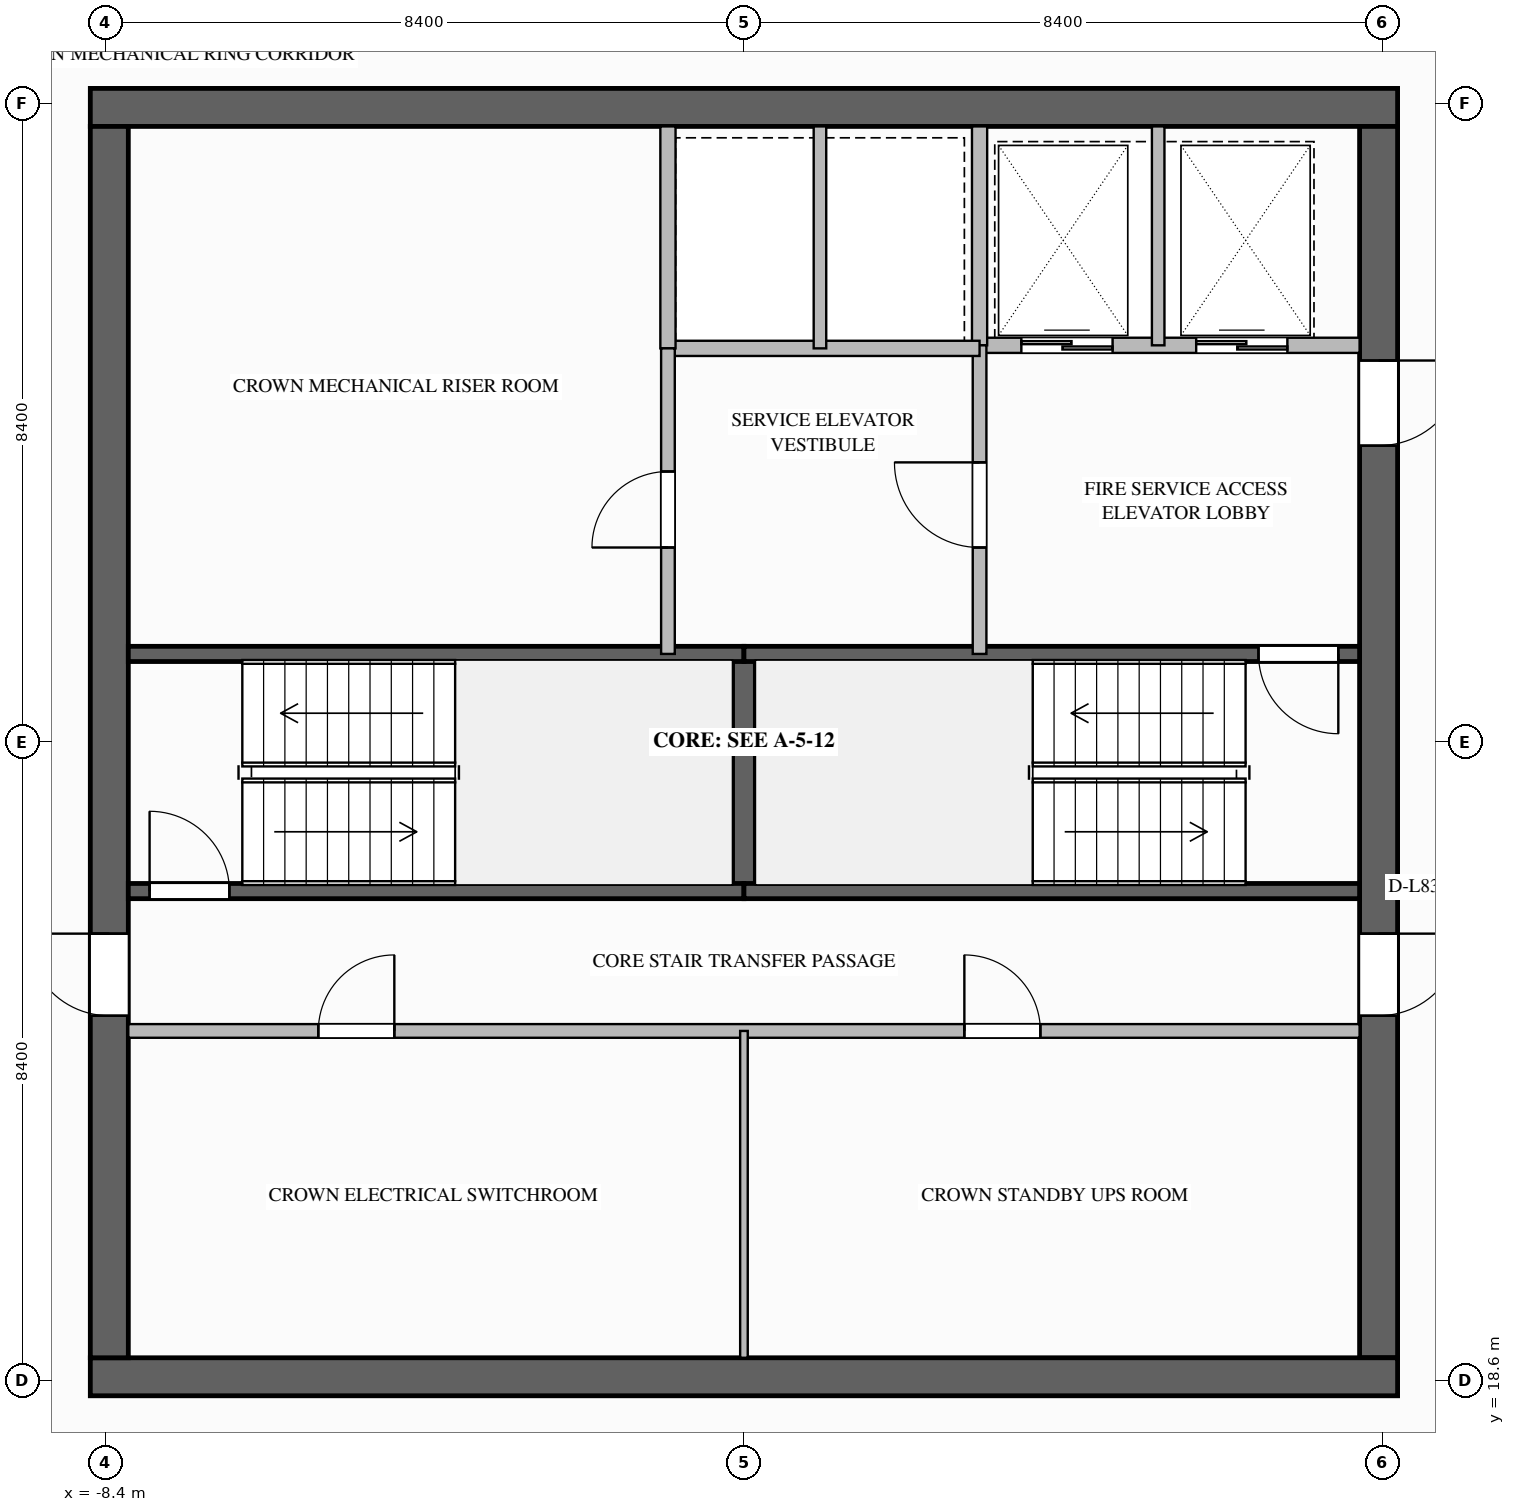
"""IFC4 building model, lengths in metres.
Left out: names, types, materials, properties, quantities, classifications, styles, units other than length and angle.
Written with IfcOpenShell. Run it as: python <this file> out.ifc"""

import sys

from ifc_helpers import new_model, si_unit, direction, frame, frame_2d, origin, place, context, subcontext, project, spatial, rectangle, extrude, element, fill, save


model = new_model("IFC4")
c1 = context("Model", 3, precision=1e-05, world=origin(), true_north=direction((0.0, 1.0)))
c2 = subcontext(c1, "Body", "Model", "MODEL_VIEW")
j1 = project(units=[si_unit("LENGTHUNIT", "METRE"), si_unit("PLANEANGLEUNIT", "RADIAN")], contexts=[c1])
p1 = place(None, origin())
s1 = spatial("IfcSite", under=j1, at=p1, CompositionType="ELEMENT")
p2 = place(p1, origin())
s2 = spatial("IfcBuilding", under=s1, at=p2, CompositionType="ELEMENT")
p3 = place(p2, frame((0.0, 0.0, 319.4)))
s3 = spatial("IfcBuildingStorey", under=s2, at=p3, CompositionType="ELEMENT", Elevation=319.4)
p4 = place(p3, frame((-8.6, 35.35, 0.0), z_axis=(0.0, 0.0, 1.0), x_axis=(1.0, 0.0, 0.0)))
e1 = element("IfcWall", 1, at=p4, inside=s3, PredefinedType="SHEAR", context=c2, shape_type="SweptSolid", body=[
    extrude(rectangle(XDim=17.2, YDim=0.5, at=frame_2d((8.6, 0.0))), origin(), (0.0, 0.0, 1.0), 3.8),
])
p5 = place(p3, frame((8.35, 35.1, 0.0), z_axis=(0.0, 0.0, 1.0), x_axis=(0.0, -1.0, 0.0)))
e2 = element("IfcWall", 2, at=p5, inside=s3, PredefinedType="SHEAR", context=c2, shape_type="SweptSolid", body=[
    extrude(rectangle(XDim=16.2, YDim=0.5, at=frame_2d((8.1, 0.0))), origin(), (0.0, 0.0, 1.0), 3.8),
])
p6 = place(p5, frame((3.08, 0.0, 0.0)))
e3 = element("IfcOpeningElement", 3, at=p6, cuts=e2, PredefinedType="OPENING", context=c2, shape_type="SweptSolid", body=[
    extrude(rectangle(XDim=1.12, YDim=2.1, at=frame_2d((0.56, 1.05))), frame((0.0, 0.26, 0.0), z_axis=(0.0, -1.0, 0.0), x_axis=(1.0, 0.0, 0.0)), (0.0, 0.0, 1.0), 0.52),
])
p7 = place(p5, frame((10.62, 0.0, 0.0)))
e4 = element("IfcOpeningElement", 4, at=p7, cuts=e2, PredefinedType="OPENING", context=c2, shape_type="SweptSolid", body=[
    extrude(rectangle(XDim=1.08, YDim=2.04, at=frame_2d((0.54, 1.02))), frame((0.0, 0.26, 0.0), z_axis=(0.0, -1.0, 0.0), x_axis=(1.0, 0.0, 0.0)), (0.0, 0.0, 1.0), 0.52),
])
p8 = place(p3, frame((8.6, 18.65, 0.0), z_axis=(0.0, 0.0, 1.0), x_axis=(-1.0, 0.0, 0.0)))
e5 = element("IfcWall", 5, at=p8, inside=s3, PredefinedType="SHEAR", context=c2, shape_type="SweptSolid", body=[
    extrude(rectangle(XDim=17.2, YDim=0.5, at=frame_2d((8.6, 0.0))), origin(), (0.0, 0.0, 1.0), 3.8),
])
p9 = place(p3, frame((-8.35, 18.9, 0.0), z_axis=(0.0, 0.0, 1.0), x_axis=(0.0, 1.0, 0.0)))
e6 = element("IfcWall", 6, at=p9, inside=s3, PredefinedType="SHEAR", context=c2, shape_type="SweptSolid", body=[
    extrude(rectangle(XDim=16.2, YDim=0.5, at=frame_2d((8.1, 0.0))), origin(), (0.0, 0.0, 1.0), 3.8),
])
p10 = place(p9, frame((4.5, 0.0, 0.0)))
e7 = element("IfcOpeningElement", 7, at=p10, cuts=e6, PredefinedType="OPENING", context=c2, shape_type="SweptSolid", body=[
    extrude(rectangle(XDim=1.08, YDim=2.04, at=frame_2d((0.54, 1.02))), frame((0.0, 0.26, 0.0), z_axis=(0.0, -1.0, 0.0), x_axis=(1.0, 0.0, 0.0)), (0.0, 0.0, 1.0), 0.52),
])
p11 = place(p3, frame((0.0, 25.04, 0.0), z_axis=(0.0, 0.0, 1.0), x_axis=(0.0, 1.0, 0.0)))
e8 = element("IfcWall", 8, at=p11, inside=s3, PredefinedType="SOLIDWALL", context=c2, shape_type="SweptSolid", body=[
    extrude(rectangle(XDim=3.12, YDim=0.3, at=frame_2d((1.56, 0.0))), origin(), (0.0, 0.0, 1.0), 3.48),
])
p12 = place(p3, frame((-8.1, 25.04, 0.0), z_axis=(0.0, 0.0, 1.0), x_axis=(1.0, 0.0, 0.0)))
e9 = element("IfcWall", 9, at=p12, inside=s3, PredefinedType="SOLIDWALL", context=c2, shape_type="SweptSolid", body=[
    extrude(rectangle(XDim=8.1, YDim=0.2, at=frame_2d((4.05, 0.0))), origin(), (0.0, 0.0, 1.0), 3.48),
])
p13 = place(p12, frame((0.28, 0.0, 0.0)))
e10 = element("IfcOpeningElement", 10, at=p13, cuts=e9, PredefinedType="OPENING", context=c2, shape_type="SweptSolid", body=[
    extrude(rectangle(XDim=1.05, YDim=2.1, at=frame_2d((0.525, 1.05))), frame((0.0, 0.11, 0.0), z_axis=(0.0, -1.0, 0.0), x_axis=(1.0, 0.0, 0.0)), (0.0, 0.0, 1.0), 0.22),
])
for number, where, z_axis, x_axis in (
    (11, (-8.1, 28.16, 0.0), (0.0, 0.0, 1.0), (1.0, 0.0, 0.0)),
    (12, (0.0, 25.04, 0.0), (0.0, 0.0, 1.0), (1.0, 0.0, 0.0)),
):
    element("IfcWall", number, at=place(p3, frame(where, z_axis=z_axis, x_axis=x_axis)), inside=s3, PredefinedType="SOLIDWALL", context=c2, shape_type="SweptSolid", body=[
        extrude(rectangle(XDim=8.1, YDim=0.2, at=frame_2d((4.05, 0.0))), origin(), (0.0, 0.0, 1.0), 3.48),
    ])
p14 = place(p3, frame((8.1, 28.16, 0.0), z_axis=(0.0, 0.0, 1.0), x_axis=(-1.0, 0.0, 0.0)))
e13 = element("IfcWall", 13, at=p14, inside=s3, PredefinedType="SOLIDWALL", context=c2, shape_type="SweptSolid", body=[
    extrude(rectangle(XDim=8.1, YDim=0.2, at=frame_2d((4.05, 0.0))), origin(), (0.0, 0.0, 1.0), 3.48),
])
p15 = place(p14, frame((0.28, 0.0, 0.0)))
e14 = element("IfcOpeningElement", 14, at=p15, cuts=e13, PredefinedType="OPENING", context=c2, shape_type="SweptSolid", body=[
    extrude(rectangle(XDim=1.05, YDim=2.1, at=frame_2d((0.525, 1.05))), frame((0.0, 0.11, 0.0), z_axis=(0.0, -1.0, 0.0), x_axis=(1.0, 0.0, 0.0)), (0.0, 0.0, 1.0), 0.22),
])
p16 = place(p3, frame((3.1, 32.22, 0.0), z_axis=(0.0, 0.0, 1.0), x_axis=(1.0, 0.0, 0.0)))
e15 = element("IfcWall", 15, at=p16, inside=s3, PredefinedType="SOLIDWALL", context=c2, shape_type="SweptSolid", body=[
    extrude(rectangle(XDim=5.0, YDim=0.2, at=frame_2d((2.5, 0.0))), origin(), (0.0, 0.0, 1.0), 3.48),
])
p17 = place(p16, frame((0.55, 0.0, 0.0)))
e16 = element("IfcOpeningElement", 16, at=p17, cuts=e15, PredefinedType="OPENING", context=c2, shape_type="SweptSolid", body=[
    extrude(rectangle(XDim=1.2, YDim=2.2, at=frame_2d((0.6, 1.1))), frame((0.0, 0.11, 0.0), z_axis=(0.0, -1.0, 0.0), x_axis=(1.0, 0.0, 0.0)), (0.0, 0.0, 1.0), 0.22),
])
p18 = place(p16, frame((2.85, 0.0, 0.0)))
e17 = element("IfcOpeningElement", 17, at=p18, cuts=e15, PredefinedType="OPENING", context=c2, shape_type="SweptSolid", body=[
    extrude(rectangle(XDim=1.2, YDim=2.2, at=frame_2d((0.6, 1.1))), frame((0.0, 0.11, 0.0), z_axis=(0.0, -1.0, 0.0), x_axis=(1.0, 0.0, 0.0)), (0.0, 0.0, 1.0), 0.22),
])
p19 = place(p3, frame((3.1, 32.22, 0.0), z_axis=(0.0, 0.0, 1.0), x_axis=(0.0, 1.0, 0.0)))
e18 = element("IfcWall", 18, at=p19, inside=s3, PredefinedType="SOLIDWALL", context=c2, shape_type="SweptSolid", body=[
    extrude(rectangle(XDim=2.88, YDim=0.2, at=frame_2d((1.44, 0.0))), origin(), (0.0, 0.0, 1.0), 3.48),
])
p20 = place(p3, frame((5.45, 32.22, 0.0), z_axis=(0.0, 0.0, 1.0), x_axis=(0.0, 1.0, 0.0)))
e19 = element("IfcWall", 19, at=p20, inside=s3, PredefinedType="PARTITIONING", context=c2, shape_type="SweptSolid", body=[
    extrude(rectangle(XDim=2.88, YDim=0.165, at=frame_2d((1.44, 0.0))), origin(), (0.0, 0.0, 1.0), 3.48),
])
p21 = place(p3, frame((3.1, 28.16, 0.0), z_axis=(0.0, 0.0, 1.0), x_axis=(0.0, 1.0, 0.0)))
e20 = element("IfcWall", 20, at=p21, inside=s3, PredefinedType="SOLIDWALL", context=c2, shape_type="SweptSolid", body=[
    extrude(rectangle(XDim=4.06, YDim=0.18, at=frame_2d((2.03, 0.0))), origin(), (0.0, 0.0, 1.0), 3.48),
])
p22 = place(p21, frame((1.4, 0.0, 0.0)))
e21 = element("IfcOpeningElement", 21, at=p22, cuts=e20, PredefinedType="OPENING", context=c2, shape_type="SweptSolid", body=[
    extrude(rectangle(XDim=1.12, YDim=2.1, at=frame_2d((0.56, 1.05))), frame((0.0, 0.1, 0.0), z_axis=(0.0, -1.0, 0.0), x_axis=(1.0, 0.0, 0.0)), (0.0, 0.0, 1.0), 0.2),
])
p23 = place(p3, frame((-1.0, 32.18, 0.0), z_axis=(0.0, 0.0, 1.0), x_axis=(1.0, 0.0, 0.0)))
e22 = element("IfcWall", 22, at=p23, inside=s3, PredefinedType="SOLIDWALL", context=c2, shape_type="SweptSolid", body=[
    extrude(rectangle(XDim=4.1, YDim=0.2, at=frame_2d((2.05, 0.0))), origin(), (0.0, 0.0, 1.0), 3.48),
])
p24 = place(p3, frame((-1.0, 32.18, 0.0), z_axis=(0.0, 0.0, 1.0), x_axis=(0.0, 1.0, 0.0)))
e23 = element("IfcWall", 23, at=p24, inside=s3, PredefinedType="SOLIDWALL", context=c2, shape_type="SweptSolid", body=[
    extrude(rectangle(XDim=2.92, YDim=0.2, at=frame_2d((1.46, 0.0))), origin(), (0.0, 0.0, 1.0), 3.48),
])
p25 = place(p3, frame((1.0, 32.18, 0.0), z_axis=(0.0, 0.0, 1.0), x_axis=(0.0, 1.0, 0.0)))
e24 = element("IfcWall", 24, at=p25, inside=s3, PredefinedType="PARTITIONING", context=c2, shape_type="SweptSolid", body=[
    extrude(rectangle(XDim=2.92, YDim=0.165, at=frame_2d((1.46, 0.0))), origin(), (0.0, 0.0, 1.0), 3.48),
])
p26 = place(p3, frame((-1.0, 28.16, 0.0), z_axis=(0.0, 0.0, 1.0), x_axis=(0.0, 1.0, 0.0)))
e25 = element("IfcWall", 25, at=p26, inside=s3, PredefinedType="SOLIDWALL", context=c2, shape_type="SweptSolid", body=[
    extrude(rectangle(XDim=4.02, YDim=0.18, at=frame_2d((2.01, 0.0))), origin(), (0.0, 0.0, 1.0), 3.48),
])
p27 = place(p26, frame((1.4, 0.0, 0.0)))
e26 = element("IfcOpeningElement", 26, at=p27, cuts=e25, PredefinedType="OPENING", context=c2, shape_type="SweptSolid", body=[
    extrude(rectangle(XDim=1.0, YDim=2.1, at=frame_2d((0.5, 1.05))), frame((0.0, 0.1, 0.0), z_axis=(0.0, -1.0, 0.0), x_axis=(1.0, 0.0, 0.0)), (0.0, 0.0, 1.0), 0.2),
])
p28 = place(p3, frame((-8.1, 23.2, 0.0), z_axis=(0.0, 0.0, 1.0), x_axis=(1.0, 0.0, 0.0)))
e27 = element("IfcWall", 27, at=p28, inside=s3, PredefinedType="SOLIDWALL", context=c2, shape_type="SweptSolid", body=[
    extrude(rectangle(XDim=16.2, YDim=0.18, at=frame_2d((8.1, 0.0))), origin(), (0.0, 0.0, 1.0), 3.48),
])
p29 = place(p28, frame((2.5, 0.0, 0.0)))
e28 = element("IfcOpeningElement", 28, at=p29, cuts=e27, PredefinedType="OPENING", context=c2, shape_type="SweptSolid", body=[
    extrude(rectangle(XDim=1.0, YDim=2.1, at=frame_2d((0.5, 1.05))), frame((0.0, 0.1, 0.0), z_axis=(0.0, -1.0, 0.0), x_axis=(1.0, 0.0, 0.0)), (0.0, 0.0, 1.0), 0.2),
])
p30 = place(p28, frame((11.0, 0.0, 0.0)))
e29 = element("IfcOpeningElement", 29, at=p30, cuts=e27, PredefinedType="OPENING", context=c2, shape_type="SweptSolid", body=[
    extrude(rectangle(XDim=1.0, YDim=2.1, at=frame_2d((0.5, 1.05))), frame((0.0, 0.1, 0.0), z_axis=(0.0, -1.0, 0.0), x_axis=(1.0, 0.0, 0.0)), (0.0, 0.0, 1.0), 0.2),
])
p31 = place(p3, frame((0.0, 18.9, 0.0), z_axis=(0.0, 0.0, 1.0), x_axis=(0.0, 1.0, 0.0)))
e30 = element("IfcWall", 30, at=p31, inside=s3, PredefinedType="PARTITIONING", context=c2, shape_type="SweptSolid", body=[
    extrude(rectangle(XDim=4.3, YDim=0.1, at=frame_2d((2.15, 0.0))), origin(), (0.0, 0.0, 1.0), 3.48),
])
p32 = place(p13, origin())
e31 = element("IfcDoor", 31, at=p32, inside=s3, OperationType="SINGLE_SWING_LEFT", PredefinedType="DOOR", context=c2, shape_type="SweptSolid", body=[
    extrude(rectangle(XDim=1.05, YDim=2.1, at=frame_2d((0.525, 1.05))), frame((0.0, 0.025, 0.0), z_axis=(0.0, -1.0, 0.0), x_axis=(1.0, 0.0, 0.0)), (0.0, 0.0, 1.0), 0.05),
])
fill(e10, e31)
p33 = place(p15, origin())
e32 = element("IfcDoor", 32, at=p33, inside=s3, OperationType="SINGLE_SWING_LEFT", PredefinedType="DOOR", context=c2, shape_type="SweptSolid", body=[
    extrude(rectangle(XDim=1.05, YDim=2.1, at=frame_2d((0.525, 1.05))), frame((0.0, 0.025, 0.0), z_axis=(0.0, -1.0, 0.0), x_axis=(1.0, 0.0, 0.0)), (0.0, 0.0, 1.0), 0.05),
])
fill(e14, e32)
p34 = place(p17, origin())
e33 = element("IfcDoor", 33, at=p34, inside=s3, OperationType="SLIDING_TO_LEFT", PredefinedType="DOOR", context=c2, shape_type="SweptSolid", body=[
    extrude(rectangle(XDim=1.2, YDim=2.2, at=frame_2d((0.6, 1.1))), frame((0.0, 0.025, 0.0), z_axis=(0.0, -1.0, 0.0), x_axis=(1.0, 0.0, 0.0)), (0.0, 0.0, 1.0), 0.05),
])
fill(e16, e33)
p35 = place(p18, origin())
e34 = element("IfcDoor", 34, at=p35, inside=s3, OperationType="SLIDING_TO_LEFT", PredefinedType="DOOR", context=c2, shape_type="SweptSolid", body=[
    extrude(rectangle(XDim=1.2, YDim=2.2, at=frame_2d((0.6, 1.1))), frame((0.0, 0.025, 0.0), z_axis=(0.0, -1.0, 0.0), x_axis=(1.0, 0.0, 0.0)), (0.0, 0.0, 1.0), 0.05),
])
fill(e17, e34)
p36 = place(p22, origin())
e35 = element("IfcDoor", 35, at=p36, inside=s3, OperationType="SINGLE_SWING_RIGHT", PredefinedType="DOOR", context=c2, shape_type="SweptSolid", body=[
    extrude(rectangle(XDim=1.12, YDim=2.1, at=frame_2d((0.56, 1.05))), frame((0.0, 0.025, 0.0), z_axis=(0.0, -1.0, 0.0), x_axis=(1.0, 0.0, 0.0)), (0.0, 0.0, 1.0), 0.05),
])
fill(e21, e35)
p37 = place(p6, origin())
e36 = element("IfcDoor", 36, at=p37, inside=s3, OperationType="SINGLE_SWING_LEFT", PredefinedType="DOOR", context=c2, shape_type="SweptSolid", body=[
    extrude(rectangle(XDim=1.12, YDim=2.1, at=frame_2d((0.56, 1.05))), frame((0.0, 0.025, 0.0), z_axis=(0.0, -1.0, 0.0), x_axis=(1.0, 0.0, 0.0)), (0.0, 0.0, 1.0), 0.05),
])
fill(e3, e36)
p38 = place(p27, origin())
e37 = element("IfcDoor", 37, at=p38, inside=s3, OperationType="SINGLE_SWING_LEFT", PredefinedType="DOOR", context=c2, shape_type="SweptSolid", body=[
    extrude(rectangle(XDim=1.0, YDim=2.1, at=frame_2d((0.5, 1.05))), frame((0.0, 0.025, 0.0), z_axis=(0.0, -1.0, 0.0), x_axis=(1.0, 0.0, 0.0)), (0.0, 0.0, 1.0), 0.05),
])
fill(e26, e37)
p39 = place(p10, origin())
e38 = element("IfcDoor", 38, at=p39, inside=s3, OperationType="SINGLE_SWING_RIGHT", PredefinedType="DOOR", context=c2, shape_type="SweptSolid", body=[
    extrude(rectangle(XDim=1.08, YDim=2.04, at=frame_2d((0.54, 1.02))), frame((0.0, 0.025, 0.0), z_axis=(0.0, -1.0, 0.0), x_axis=(1.0, 0.0, 0.0)), (0.0, 0.0, 1.0), 0.05),
])
fill(e7, e38)
p40 = place(p7, origin())
e39 = element("IfcDoor", 39, at=p40, inside=s3, OperationType="SINGLE_SWING_LEFT", PredefinedType="DOOR", context=c2, shape_type="SweptSolid", body=[
    extrude(rectangle(XDim=1.08, YDim=2.04, at=frame_2d((0.54, 1.02))), frame((0.0, 0.025, 0.0), z_axis=(0.0, -1.0, 0.0), x_axis=(1.0, 0.0, 0.0)), (0.0, 0.0, 1.0), 0.05),
])
fill(e4, e39)
p41 = place(p29, origin())
e40 = element("IfcDoor", 40, at=p41, inside=s3, OperationType="SINGLE_SWING_RIGHT", PredefinedType="DOOR", context=c2, shape_type="SweptSolid", body=[
    extrude(rectangle(XDim=1.0, YDim=2.1, at=frame_2d((0.5, 1.05))), frame((0.0, 0.025, 0.0), z_axis=(0.0, -1.0, 0.0), x_axis=(1.0, 0.0, 0.0)), (0.0, 0.0, 1.0), 0.05),
])
fill(e28, e40)
p42 = place(p30, origin())
e41 = element("IfcDoor", 41, at=p42, inside=s3, OperationType="SINGLE_SWING_LEFT", PredefinedType="DOOR", context=c2, shape_type="SweptSolid", body=[
    extrude(rectangle(XDim=1.0, YDim=2.1, at=frame_2d((0.5, 1.05))), frame((0.0, 0.025, 0.0), z_axis=(0.0, -1.0, 0.0), x_axis=(1.0, 0.0, 0.0)), (0.0, 0.0, 1.0), 0.05),
])
fill(e29, e41)
save(model, sys.argv[1])
